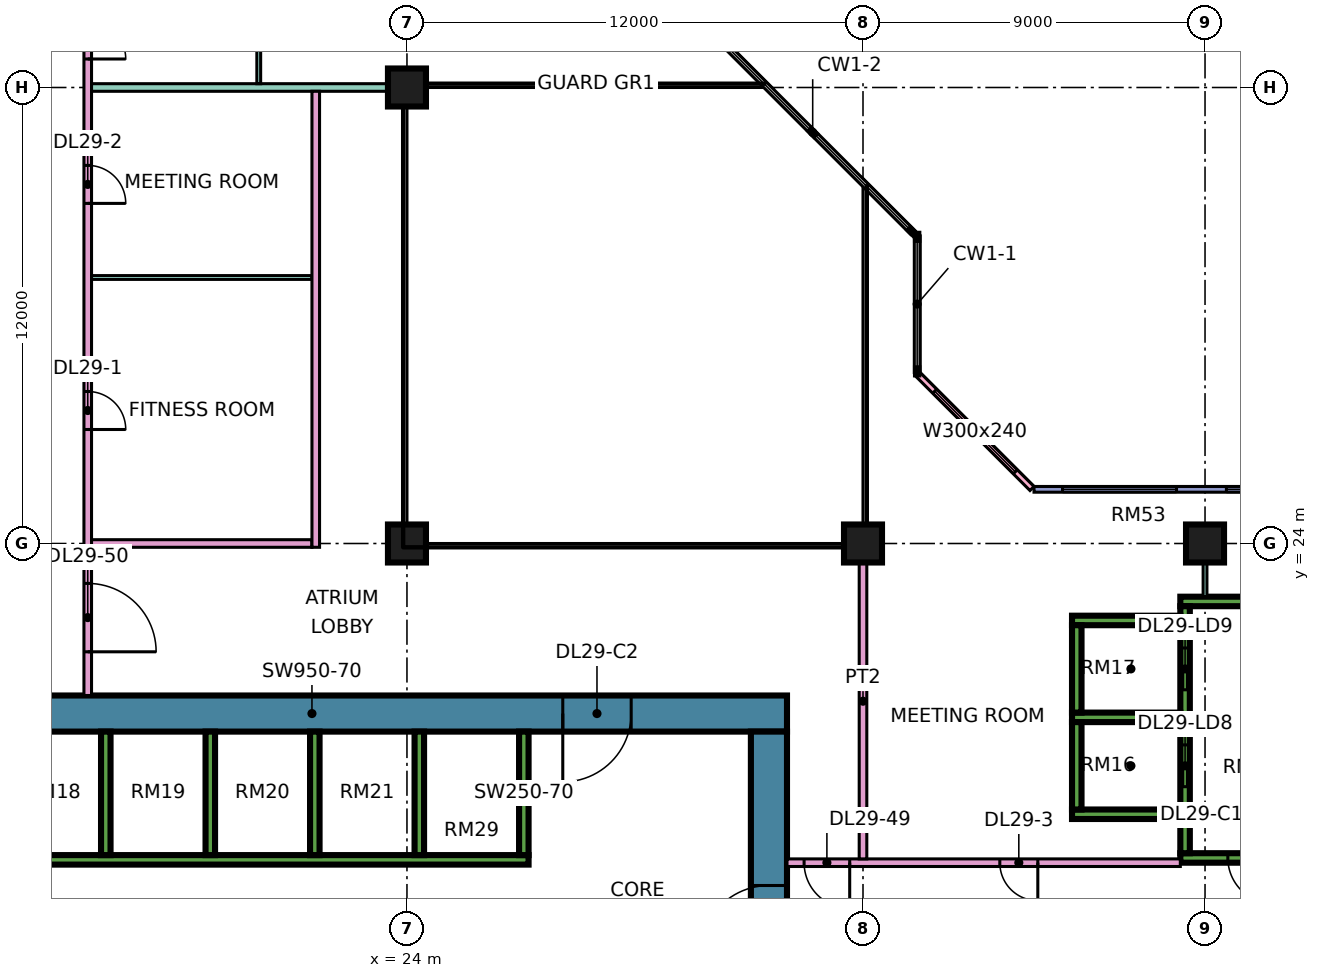
"""IFC4 building model, lengths in metres.
Left out: names, types, materials, properties, quantities, classifications, styles, units other than length and angle.
Written with IfcOpenShell. Run it as: python <this file> out.ifc"""

import sys

from ifc_helpers import new_model, si_unit, direction, frame, frame_2d, origin, origin_2d, place, context, subcontext, project, spatial, rectangle, extrude, element, fill, save


model = new_model("IFC4")
c1 = context("Model", 3, precision=1e-05, world=origin(), true_north=direction((0.0, 1.0)))
c2 = subcontext(c1, "Body", "Model", "MODEL_VIEW")
j1 = project(units=[si_unit("LENGTHUNIT", "METRE"), si_unit("PLANEANGLEUNIT", "RADIAN")], contexts=[c1])
p1 = place(None, origin())
s1 = spatial("IfcSite", under=j1, at=p1, CompositionType="ELEMENT")
p2 = place(p1, origin())
s2 = spatial("IfcBuilding", under=s1, at=p2, CompositionType="ELEMENT")
p3 = place(p2, frame((0.0, 0.0, 125.65)))
s3 = spatial("IfcBuildingStorey", under=s2, at=p3, CompositionType="ELEMENT", Elevation=125.65)
for number, where, z_axis, x_axis in (
    (1, (24.0, 24.0, 0.0), (0.0, 0.0, 1.0), (1.0, 0.0, 0.0)),
    (2, (24.0, 36.0, 0.0), (0.0, 0.0, 1.0), (1.0, 0.0, 0.0)),
    (3, (36.0, 24.0, 0.0), (0.0, 0.0, 1.0), (1.0, 0.0, 0.0)),
    (4, (45.0, 24.0, 0.0), (0.0, 0.0, 1.0), (1.0, 0.0, 0.0)),
):
    element("IfcColumn", number, at=place(p3, frame(where, z_axis=z_axis, x_axis=x_axis)), inside=s3, PredefinedType="COLUMN", context=c2, shape_type="SweptSolid", body=[
        extrude(rectangle(XDim=1.0, YDim=1.0, at=origin_2d()), origin(), (0.0, 0.0, 1.0), 3.75),
    ])
p4 = place(p3, frame((9.0, 19.525, 0.0), z_axis=(0.0, 0.0, 1.0), x_axis=(1.0, 0.0, 0.0)))
e5 = element("IfcWall", 5, at=p4, inside=s3, PredefinedType="SHEAR", context=c2, shape_type="SweptSolid", body=[
    extrude(rectangle(XDim=25.0, YDim=0.95, at=frame_2d((12.5, 0.0))), origin(), (0.0, 0.0, 1.0), 3.75),
])
p5 = place(p4, frame((19.1, 0.0, 0.0)))
e6 = element("IfcOpeningElement", 6, at=p5, cuts=e5, PredefinedType="OPENING", context=c2, shape_type="SweptSolid", body=[
    extrude(rectangle(XDim=1.8, YDim=2.4, at=frame_2d((0.9, 1.2))), frame((0.0, 0.485, 0.0), z_axis=(0.0, -1.0, 0.0), x_axis=(1.0, 0.0, 0.0)), (0.0, 0.0, 1.0), 0.97),
])
p6 = place(p3, frame((33.525, 7.95, 0.0), z_axis=(0.0, 0.0, 1.0), x_axis=(0.0, 1.0, 0.0)))
e7 = element("IfcWall", 7, at=p6, inside=s3, PredefinedType="SHEAR", context=c2, shape_type="SweptSolid", body=[
    extrude(rectangle(XDim=11.1, YDim=0.95, at=frame_2d((5.55, 0.0))), origin(), (0.0, 0.0, 1.0), 3.75),
])
p7 = place(p6, frame((5.25, 0.0, 0.0)))
e8 = element("IfcOpeningElement", 8, at=p7, cuts=e7, PredefinedType="OPENING", context=c2, shape_type="SweptSolid", body=[
    extrude(rectangle(XDim=1.8, YDim=2.4, at=frame_2d((0.9, 1.2))), frame((0.0, 0.485, 0.0), z_axis=(0.0, -1.0, 0.0), x_axis=(1.0, 0.0, 0.0)), (0.0, 0.0, 1.0), 0.97),
])
p8 = place(p3, frame((13.45, 15.675, 0.0), z_axis=(0.0, 0.0, 1.0), x_axis=(1.0, 0.0, 0.0)))
e9 = element("IfcWall", 9, at=p8, inside=s3, PredefinedType="SHEAR", context=c2, shape_type="SweptSolid", body=[
    extrude(rectangle(XDim=13.75, YDim=0.25, at=frame_2d((6.875, 0.0))), origin(), (0.0, 0.0, 1.0), 3.75),
])
for number, where, z_axis, x_axis in (
    (10, (16.075, 15.8, 0.0), (0.0, 0.0, 1.0), (0.0, 1.0, 0.0)),
    (11, (18.825, 15.8, 0.0), (0.0, 0.0, 1.0), (0.0, 1.0, 0.0)),
    (12, (21.575, 15.8, 0.0), (0.0, 0.0, 1.0), (0.0, 1.0, 0.0)),
    (13, (24.325, 15.8, 0.0), (0.0, 0.0, 1.0), (0.0, 1.0, 0.0)),
    (14, (27.075, 15.8, 0.0), (0.0, 0.0, 1.0), (0.0, 1.0, 0.0)),
):
    element("IfcWall", number, at=place(p3, frame(where, z_axis=z_axis, x_axis=x_axis)), inside=s3, PredefinedType="SHEAR", context=c2, shape_type="SweptSolid", body=[
        extrude(rectangle(XDim=3.25, YDim=0.25, at=frame_2d((1.625, 0.0))), origin(), (0.0, 0.0, 1.0), 3.75),
    ])
p9 = place(p3, frame((44.35, 15.725, 0.0), z_axis=(0.0, 0.0, 1.0), x_axis=(1.0, 0.0, 0.0)))
e15 = element("IfcWall", 15, at=p9, inside=s3, PredefinedType="SHEAR", context=c2, shape_type="SweptSolid", body=[
    extrude(rectangle(XDim=3.425, YDim=0.25, at=frame_2d((1.712, 0.0))), origin(), (0.0, 0.0, 1.0), 3.75),
])
p10 = place(p9, frame((1.25, 0.0, 0.0)))
e16 = element("IfcOpeningElement", 16, at=p10, cuts=e15, PredefinedType="OPENING", context=c2, shape_type="SweptSolid", body=[
    extrude(rectangle(XDim=1.2, YDim=2.2, at=frame_2d((0.6, 1.1))), frame((0.0, 0.135, 0.0), z_axis=(0.0, -1.0, 0.0), x_axis=(1.0, 0.0, 0.0)), (0.0, 0.0, 1.0), 0.27),
])
p11 = place(p3, frame((44.35, 22.475, 0.0), z_axis=(0.0, 0.0, 1.0), x_axis=(1.0, 0.0, 0.0)))
e17 = element("IfcWall", 17, at=p11, inside=s3, PredefinedType="SHEAR", context=c2, shape_type="SweptSolid", body=[
    extrude(rectangle(XDim=3.425, YDim=0.25, at=frame_2d((1.712, 0.0))), origin(), (0.0, 0.0, 1.0), 3.75),
])
p12 = place(p3, frame((44.475, 15.85, 0.0), z_axis=(0.0, 0.0, 1.0), x_axis=(0.0, 1.0, 0.0)))
e18 = element("IfcWall", 18, at=p12, inside=s3, PredefinedType="SHEAR", context=c2, shape_type="SweptSolid", body=[
    extrude(rectangle(XDim=6.5, YDim=0.25, at=frame_2d((3.25, 0.0))), origin(), (0.0, 0.0, 1.0), 3.75),
])
p13 = place(p12, frame((1.75, 0.0, 0.0)))
e19 = element("IfcOpeningElement", 19, at=p13, cuts=e18, PredefinedType="OPENING", context=c2, shape_type="SweptSolid", body=[
    extrude(rectangle(XDim=1.1, YDim=2.2, at=frame_2d((0.55, 1.1))), frame((0.0, 0.135, 0.0), z_axis=(0.0, -1.0, 0.0), x_axis=(1.0, 0.0, 0.0)), (0.0, 0.0, 1.0), 0.27),
])
p14 = place(p12, frame((4.3, 0.0, 0.0)))
e20 = element("IfcOpeningElement", 20, at=p14, cuts=e18, PredefinedType="OPENING", context=c2, shape_type="SweptSolid", body=[
    extrude(rectangle(XDim=1.1, YDim=2.2, at=frame_2d((0.55, 1.1))), frame((0.0, 0.135, 0.0), z_axis=(0.0, -1.0, 0.0), x_axis=(1.0, 0.0, 0.0)), (0.0, 0.0, 1.0), 0.27),
])
for number, where, z_axis, x_axis in (
    (21, (41.5, 16.875, 0.0), (0.0, 0.0, 1.0), (1.0, 0.0, 0.0)),
    (22, (41.5, 19.425, 0.0), (0.0, 0.0, 1.0), (1.0, 0.0, 0.0)),
    (23, (41.5, 21.975, 0.0), (0.0, 0.0, 1.0), (1.0, 0.0, 0.0)),
):
    element("IfcWall", number, at=place(p3, frame(where, z_axis=z_axis, x_axis=x_axis)), inside=s3, PredefinedType="SHEAR", context=c2, shape_type="SweptSolid", body=[
        extrude(rectangle(XDim=2.85, YDim=0.25, at=frame_2d((1.425, 0.0))), origin(), (0.0, 0.0, 1.0), 3.75),
    ])
for number, where, z_axis, x_axis in (
    (24, (41.625, 17.0, 0.0), (0.0, 0.0, 1.0), (0.0, 1.0, 0.0)),
    (25, (41.625, 19.55, 0.0), (0.0, 0.0, 1.0), (0.0, 1.0, 0.0)),
):
    element("IfcWall", number, at=place(p3, frame(where, z_axis=z_axis, x_axis=x_axis)), inside=s3, PredefinedType="SHEAR", context=c2, shape_type="SweptSolid", body=[
        extrude(rectangle(XDim=2.3, YDim=0.25, at=frame_2d((1.15, 0.0))), origin(), (0.0, 0.0, 1.0), 3.75),
    ])
p15 = place(p3, frame((47.925, 25.425, 0.0), z_axis=(0.0, 0.0, 1.0), x_axis=(-1.0, 0.0, 0.0)))
e26 = element("IfcWall", 26, at=p15, inside=s3, PredefinedType="SOLIDWALL", context=c2, shape_type="SweptSolid", body=[
    extrude(rectangle(XDim=7.425, YDim=0.15, at=frame_2d((3.712, 0.0))), origin(), (0.0, 0.0, 1.0), 3.35),
])
p16 = place(p15, frame((0.562, 0.0, 0.45)))
e27 = element("IfcOpeningElement", 27, at=p16, cuts=e26, PredefinedType="OPENING", context=c2, shape_type="SweptSolid", body=[
    extrude(rectangle(XDim=1.8, YDim=2.4, at=frame_2d((0.9, 1.2))), frame((0.0, 0.085, 0.0), z_axis=(0.0, -1.0, 0.0), x_axis=(1.0, 0.0, 0.0)), (0.0, 0.0, 1.0), 0.17),
])
p17 = place(p15, frame((3.675, 0.0, 0.45)))
e28 = element("IfcOpeningElement", 28, at=p17, cuts=e26, PredefinedType="OPENING", context=c2, shape_type="SweptSolid", body=[
    extrude(rectangle(XDim=3.0, YDim=2.4, at=frame_2d((1.5, 1.2))), frame((0.0, 0.085, 0.0), z_axis=(0.0, -1.0, 0.0), x_axis=(1.0, 0.0, 0.0)), (0.0, 0.0, 1.0), 0.17),
])
p18 = place(p3, frame((40.447, 25.447, 0.0), z_axis=(0.0, 0.0, 1.0), x_axis=(-0.707106781187, 0.707106781187, 0.0)))
e29 = element("IfcWall", 29, at=p18, inside=s3, PredefinedType="SOLIDWALL", context=c2, shape_type="SweptSolid", body=[
    extrude(rectangle(XDim=4.243, YDim=0.15, at=frame_2d((2.121, 0.0))), origin(), (0.0, 0.0, 1.0), 3.35),
])
p19 = place(p18, frame((0.621, 0.0, 0.45)))
e30 = element("IfcOpeningElement", 30, at=p19, cuts=e29, PredefinedType="OPENING", context=c2, shape_type="SweptSolid", body=[
    extrude(rectangle(XDim=3.0, YDim=2.4, at=frame_2d((1.5, 1.2))), frame((0.0, 0.085, 0.0), z_axis=(0.0, -1.0, 0.0), x_axis=(1.0, 0.0, 0.0)), (0.0, 0.0, 1.0), 0.17),
])
p20 = place(p3, frame((15.6, 20.0, 0.0), z_axis=(0.0, 0.0, 1.0), x_axis=(0.0, 1.0, 0.0)))
e31 = element("IfcWall", 31, at=p20, inside=s3, PredefinedType="PARTITIONING", context=c2, shape_type="SweptSolid", body=[
    extrude(rectangle(XDim=27.775, YDim=0.2, at=frame_2d((13.887, 0.0))), origin(), (0.0, 0.0, 1.0), 3.35),
])
p21 = place(p20, frame((7.0, 0.0, 0.0)))
e32 = element("IfcOpeningElement", 32, at=p21, cuts=e31, PredefinedType="OPENING", context=c2, shape_type="SweptSolid", body=[
    extrude(rectangle(XDim=1.0, YDim=2.1, at=frame_2d((0.5, 1.05))), frame((0.0, 0.11, 0.0), z_axis=(0.0, -1.0, 0.0), x_axis=(1.0, 0.0, 0.0)), (0.0, 0.0, 1.0), 0.22),
])
p22 = place(p20, frame((12.95, 0.0, 0.0)))
e33 = element("IfcOpeningElement", 33, at=p22, cuts=e31, PredefinedType="OPENING", context=c2, shape_type="SweptSolid", body=[
    extrude(rectangle(XDim=1.0, YDim=2.1, at=frame_2d((0.5, 1.05))), frame((0.0, 0.11, 0.0), z_axis=(0.0, -1.0, 0.0), x_axis=(1.0, 0.0, 0.0)), (0.0, 0.0, 1.0), 0.22),
])
p23 = place(p20, frame((16.75, 0.0, 0.0)))
e34 = element("IfcOpeningElement", 34, at=p23, cuts=e31, PredefinedType="OPENING", context=c2, shape_type="SweptSolid", body=[
    extrude(rectangle(XDim=1.0, YDim=2.1, at=frame_2d((0.5, 1.05))), frame((0.0, 0.11, 0.0), z_axis=(0.0, -1.0, 0.0), x_axis=(1.0, 0.0, 0.0)), (0.0, 0.0, 1.0), 0.22),
])
p24 = place(p20, frame((1.15, 0.0, 0.0)))
e35 = element("IfcOpeningElement", 35, at=p24, cuts=e31, PredefinedType="OPENING", context=c2, shape_type="SweptSolid", body=[
    extrude(rectangle(XDim=1.8, YDim=2.1, at=frame_2d((0.9, 1.05))), frame((0.0, 0.11, 0.0), z_axis=(0.0, -1.0, 0.0), x_axis=(1.0, 0.0, 0.0)), (0.0, 0.0, 1.0), 0.22),
])
p25 = place(p20, frame((25.9, 0.0, 0.0)))
e36 = element("IfcOpeningElement", 36, at=p25, cuts=e31, PredefinedType="OPENING", context=c2, shape_type="SweptSolid", body=[
    extrude(rectangle(XDim=1.0, YDim=2.1, at=frame_2d((0.5, 1.05))), frame((0.0, 0.11, 0.0), z_axis=(0.0, -1.0, 0.0), x_axis=(1.0, 0.0, 0.0)), (0.0, 0.0, 1.0), 0.22),
])
p26 = place(p3, frame((15.7, 24.0, 0.0), z_axis=(0.0, 0.0, 1.0), x_axis=(1.0, 0.0, 0.0)))
e37 = element("IfcWall", 37, at=p26, inside=s3, PredefinedType="PARTITIONING", context=c2, shape_type="SweptSolid", body=[
    extrude(rectangle(XDim=5.8, YDim=0.2, at=frame_2d((2.9, 0.0))), origin(), (0.0, 0.0, 1.0), 3.35),
])
p27 = place(p3, frame((15.7, 31.0, 0.0), z_axis=(0.0, 0.0, 1.0), x_axis=(1.0, 0.0, 0.0)))
e38 = element("IfcWall", 38, at=p27, inside=s3, PredefinedType="PARTITIONING", context=c2, shape_type="SweptSolid", body=[
    extrude(rectangle(XDim=5.8, YDim=0.1, at=frame_2d((2.9, 0.0))), origin(), (0.0, 0.0, 1.0), 3.35),
])
p28 = place(p3, frame((15.7, 36.0, 0.0), z_axis=(0.0, 0.0, 1.0), x_axis=(1.0, 0.0, 0.0)))
e39 = element("IfcWall", 39, at=p28, inside=s3, PredefinedType="PARTITIONING", context=c2, shape_type="SweptSolid", body=[
    extrude(rectangle(XDim=8.3, YDim=0.2, at=frame_2d((4.15, 0.0))), origin(), (0.0, 0.0, 1.0), 3.35),
])
p29 = place(p3, frame((20.1, 36.1, 0.0), z_axis=(0.0, 0.0, 1.0), x_axis=(0.0, 1.0, 0.0)))
e40 = element("IfcWall", 40, at=p29, inside=s3, PredefinedType="PARTITIONING", context=c2, shape_type="SweptSolid", body=[
    extrude(rectangle(XDim=2.85, YDim=0.1, at=frame_2d((1.425, 0.0))), origin(), (0.0, 0.0, 1.0), 3.35),
])
p30 = place(p29, frame((0.95, 0.0, 0.0)))
e41 = element("IfcOpeningElement", 41, at=p30, cuts=e40, PredefinedType="OPENING", context=c2, shape_type="SweptSolid", body=[
    extrude(rectangle(XDim=0.9, YDim=2.1, at=frame_2d((0.45, 1.05))), frame((0.0, 0.06, 0.0), z_axis=(0.0, -1.0, 0.0), x_axis=(1.0, 0.0, 0.0)), (0.0, 0.0, 1.0), 0.12),
])
p31 = place(p3, frame((21.6, 23.9, 0.0), z_axis=(0.0, 0.0, 1.0), x_axis=(0.0, 1.0, 0.0)))
e42 = element("IfcWall", 42, at=p31, inside=s3, PredefinedType="PARTITIONING", context=c2, shape_type="SweptSolid", body=[
    extrude(rectangle(XDim=12.0, YDim=0.2, at=frame_2d((6.0, 0.0))), origin(), (0.0, 0.0, 1.0), 3.35),
])
p32 = place(p3, frame((34.0, 15.6, 0.0), z_axis=(0.0, 0.0, 1.0), x_axis=(1.0, 0.0, 0.0)))
e43 = element("IfcWall", 43, at=p32, inside=s3, PredefinedType="PARTITIONING", context=c2, shape_type="SweptSolid", body=[
    extrude(rectangle(XDim=10.35, YDim=0.2, at=frame_2d((5.175, 0.0))), origin(), (0.0, 0.0, 1.0), 3.35),
])
p33 = place(p32, frame((5.6, 0.0, 0.0)))
e44 = element("IfcOpeningElement", 44, at=p33, cuts=e43, PredefinedType="OPENING", context=c2, shape_type="SweptSolid", body=[
    extrude(rectangle(XDim=1.0, YDim=2.1, at=frame_2d((0.5, 1.05))), frame((0.0, 0.11, 0.0), z_axis=(0.0, -1.0, 0.0), x_axis=(1.0, 0.0, 0.0)), (0.0, 0.0, 1.0), 0.22),
])
p34 = place(p32, frame((0.45, 0.0, 0.0)))
e45 = element("IfcOpeningElement", 45, at=p34, cuts=e43, PredefinedType="OPENING", context=c2, shape_type="SweptSolid", body=[
    extrude(rectangle(XDim=1.2, YDim=2.1, at=frame_2d((0.6, 1.05))), frame((0.0, 0.11, 0.0), z_axis=(0.0, -1.0, 0.0), x_axis=(1.0, 0.0, 0.0)), (0.0, 0.0, 1.0), 0.22),
])
p35 = place(p3, frame((36.0, 15.7, 0.0), z_axis=(0.0, 0.0, 1.0), x_axis=(0.0, 1.0, 0.0)))
e46 = element("IfcWall", 46, at=p35, inside=s3, PredefinedType="PARTITIONING", context=c2, shape_type="SweptSolid", body=[
    extrude(rectangle(XDim=8.3, YDim=0.2, at=frame_2d((4.15, 0.0))), origin(), (0.0, 0.0, 1.0), 3.35),
])
p36 = place(p3, frame((45.0, 22.6, 0.0), z_axis=(0.0, 0.0, 1.0), x_axis=(0.0, 1.0, 0.0)))
e47 = element("IfcWall", 47, at=p36, inside=s3, PredefinedType="PARTITIONING", context=c2, shape_type="SweptSolid", body=[
    extrude(rectangle(XDim=1.4, YDim=0.1, at=frame_2d((0.7, 0.0))), origin(), (0.0, 0.0, 1.0), 3.35),
])
p37 = place(p16, origin())
e48 = element("IfcWindow", 48, at=p37, inside=s3, PartitioningType="SINGLE_PANEL", PredefinedType="WINDOW", context=c2, shape_type="SweptSolid", body=[
    extrude(rectangle(XDim=1.8, YDim=2.4, at=frame_2d((0.9, 1.2))), frame((0.0, 0.03, 0.0), z_axis=(0.0, -1.0, 0.0), x_axis=(1.0, 0.0, 0.0)), (0.0, 0.0, 1.0), 0.06),
])
fill(e27, e48)
p38 = place(p17, origin())
e49 = element("IfcWindow", 49, at=p38, inside=s3, PartitioningType="SINGLE_PANEL", PredefinedType="WINDOW", context=c2, shape_type="SweptSolid", body=[
    extrude(rectangle(XDim=3.0, YDim=2.4, at=frame_2d((1.5, 1.2))), frame((0.0, 0.03, 0.0), z_axis=(0.0, -1.0, 0.0), x_axis=(1.0, 0.0, 0.0)), (0.0, 0.0, 1.0), 0.06),
])
fill(e28, e49)
p39 = place(p19, origin())
e50 = element("IfcWindow", 50, at=p39, inside=s3, PartitioningType="SINGLE_PANEL", PredefinedType="WINDOW", context=c2, shape_type="SweptSolid", body=[
    extrude(rectangle(XDim=3.0, YDim=2.4, at=frame_2d((1.5, 1.2))), frame((0.0, 0.03, 0.0), z_axis=(0.0, -1.0, 0.0), x_axis=(1.0, 0.0, 0.0)), (0.0, 0.0, 1.0), 0.06),
])
fill(e30, e50)
p40 = place(p7, origin())
e51 = element("IfcDoor", 51, at=p40, inside=s3, OperationType="DOUBLE_DOOR_SINGLE_SWING", PredefinedType="DOOR", context=c2, shape_type="SweptSolid", body=[
    extrude(rectangle(XDim=1.8, YDim=2.4, at=frame_2d((0.9, 1.2))), frame((0.0, 0.025, 0.0), z_axis=(0.0, -1.0, 0.0), x_axis=(1.0, 0.0, 0.0)), (0.0, 0.0, 1.0), 0.05),
])
fill(e8, e51)
p41 = place(p5, frame((1.8, 0.0, 0.0), z_axis=(0.0, 0.0, 1.0), x_axis=(-1.0, 0.0, 0.0)))
e52 = element("IfcDoor", 52, at=p41, inside=s3, OperationType="DOUBLE_DOOR_SINGLE_SWING", PredefinedType="DOOR", context=c2, shape_type="SweptSolid", body=[
    extrude(rectangle(XDim=1.8, YDim=2.4, at=frame_2d((0.9, 1.2))), frame((0.0, 0.025, 0.0), z_axis=(0.0, -1.0, 0.0), x_axis=(1.0, 0.0, 0.0)), (0.0, 0.0, 1.0), 0.05),
])
fill(e6, e52)
p42 = place(p10, origin())
e53 = element("IfcDoor", 53, at=p42, inside=s3, OperationType="SINGLE_SWING_RIGHT", PredefinedType="DOOR", context=c2, shape_type="SweptSolid", body=[
    extrude(rectangle(XDim=1.2, YDim=2.2, at=frame_2d((0.6, 1.1))), frame((0.0, 0.025, 0.0), z_axis=(0.0, -1.0, 0.0), x_axis=(1.0, 0.0, 0.0)), (0.0, 0.0, 1.0), 0.05),
])
fill(e16, e53)
p43 = place(p13, origin())
e54 = element("IfcDoor", 54, at=p43, inside=s3, OperationType="DOUBLE_DOOR_SLIDING", PredefinedType="DOOR", context=c2, shape_type="SweptSolid", body=[
    extrude(rectangle(XDim=1.1, YDim=2.2, at=frame_2d((0.55, 1.1))), frame((0.0, 0.025, 0.0), z_axis=(0.0, -1.0, 0.0), x_axis=(1.0, 0.0, 0.0)), (0.0, 0.0, 1.0), 0.05),
])
fill(e19, e54)
p44 = place(p14, origin())
e55 = element("IfcDoor", 55, at=p44, inside=s3, OperationType="DOUBLE_DOOR_SLIDING", PredefinedType="DOOR", context=c2, shape_type="SweptSolid", body=[
    extrude(rectangle(XDim=1.1, YDim=2.2, at=frame_2d((0.55, 1.1))), frame((0.0, 0.025, 0.0), z_axis=(0.0, -1.0, 0.0), x_axis=(1.0, 0.0, 0.0)), (0.0, 0.0, 1.0), 0.05),
])
fill(e20, e55)
p45 = place(p21, frame((1.0, 0.0, 0.0), z_axis=(0.0, 0.0, 1.0), x_axis=(-1.0, 0.0, 0.0)))
e56 = element("IfcDoor", 56, at=p45, inside=s3, OperationType="SINGLE_SWING_LEFT", PredefinedType="DOOR", context=c2, shape_type="SweptSolid", body=[
    extrude(rectangle(XDim=1.0, YDim=2.1, at=frame_2d((0.5, 1.05))), frame((0.0, 0.025, 0.0), z_axis=(0.0, -1.0, 0.0), x_axis=(1.0, 0.0, 0.0)), (0.0, 0.0, 1.0), 0.05),
])
fill(e32, e56)
p46 = place(p22, frame((1.0, 0.0, 0.0), z_axis=(0.0, 0.0, 1.0), x_axis=(-1.0, 0.0, 0.0)))
e57 = element("IfcDoor", 57, at=p46, inside=s3, OperationType="SINGLE_SWING_LEFT", PredefinedType="DOOR", context=c2, shape_type="SweptSolid", body=[
    extrude(rectangle(XDim=1.0, YDim=2.1, at=frame_2d((0.5, 1.05))), frame((0.0, 0.025, 0.0), z_axis=(0.0, -1.0, 0.0), x_axis=(1.0, 0.0, 0.0)), (0.0, 0.0, 1.0), 0.05),
])
fill(e33, e57)
p47 = place(p33, origin())
e58 = element("IfcDoor", 58, at=p47, inside=s3, OperationType="SINGLE_SWING_RIGHT", PredefinedType="DOOR", context=c2, shape_type="SweptSolid", body=[
    extrude(rectangle(XDim=1.0, YDim=2.1, at=frame_2d((0.5, 1.05))), frame((0.0, 0.025, 0.0), z_axis=(0.0, -1.0, 0.0), x_axis=(1.0, 0.0, 0.0)), (0.0, 0.0, 1.0), 0.05),
])
fill(e44, e58)
p48 = place(p23, frame((1.0, 0.0, 0.0), z_axis=(0.0, 0.0, 1.0), x_axis=(-1.0, 0.0, 0.0)))
e59 = element("IfcDoor", 59, at=p48, inside=s3, OperationType="SINGLE_SWING_LEFT", PredefinedType="DOOR", context=c2, shape_type="SweptSolid", body=[
    extrude(rectangle(XDim=1.0, YDim=2.1, at=frame_2d((0.5, 1.05))), frame((0.0, 0.025, 0.0), z_axis=(0.0, -1.0, 0.0), x_axis=(1.0, 0.0, 0.0)), (0.0, 0.0, 1.0), 0.05),
])
fill(e34, e59)
p49 = place(p34, origin())
e60 = element("IfcDoor", 60, at=p49, inside=s3, OperationType="SINGLE_SWING_RIGHT", PredefinedType="DOOR", context=c2, shape_type="SweptSolid", body=[
    extrude(rectangle(XDim=1.2, YDim=2.1, at=frame_2d((0.6, 1.05))), frame((0.0, 0.025, 0.0), z_axis=(0.0, -1.0, 0.0), x_axis=(1.0, 0.0, 0.0)), (0.0, 0.0, 1.0), 0.05),
])
fill(e45, e60)
p50 = place(p24, frame((1.8, 0.0, 0.0), z_axis=(0.0, 0.0, 1.0), x_axis=(-1.0, 0.0, 0.0)))
e61 = element("IfcDoor", 61, at=p50, inside=s3, OperationType="DOUBLE_DOOR_SINGLE_SWING", PredefinedType="DOOR", context=c2, shape_type="SweptSolid", body=[
    extrude(rectangle(XDim=1.8, YDim=2.1, at=frame_2d((0.9, 1.05))), frame((0.0, 0.025, 0.0), z_axis=(0.0, -1.0, 0.0), x_axis=(1.0, 0.0, 0.0)), (0.0, 0.0, 1.0), 0.05),
])
fill(e35, e61)
save(model, sys.argv[1])
